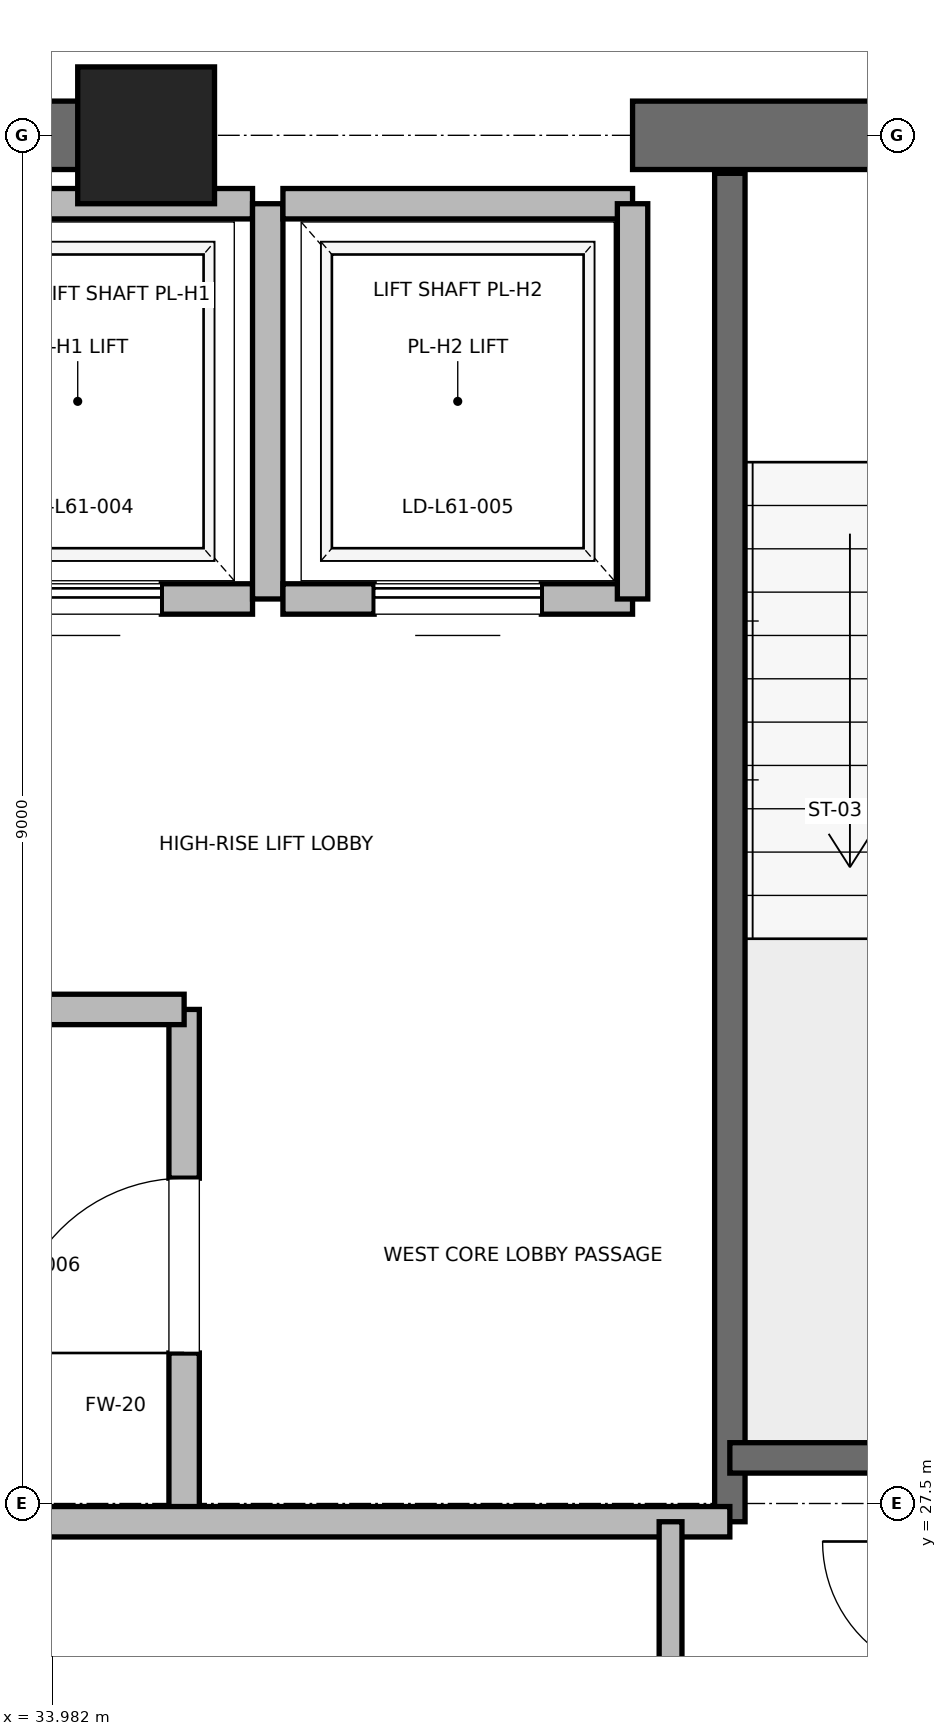
"""IFC4 building model, lengths in metres.
Left out: names, types, materials, properties, quantities, classifications, styles, units other than length and angle.
Written with IfcOpenShell. Run it as: python <this file> out.ifc"""

import sys

from ifc_helpers import new_model, si_unit, direction, frame, frame_2d, origin, origin_2d, place, context, subcontext, project, spatial, rectangle, extrude, element, fill, save


model = new_model("IFC4")
c1 = context("Model", 3, precision=1e-05, world=origin(), true_north=direction((0.0, 1.0)))
c2 = subcontext(c1, "Body", "Model", "MODEL_VIEW")
j1 = project(units=[si_unit("LENGTHUNIT", "METRE"), si_unit("PLANEANGLEUNIT", "RADIAN")], contexts=[c1])
p1 = place(None, origin())
s1 = spatial("IfcSite", under=j1, at=p1, CompositionType="ELEMENT")
p2 = place(p1, origin())
s2 = spatial("IfcBuilding", under=s1, at=p2, CompositionType="ELEMENT")
p3 = place(p2, frame((0.0, 0.0, 263.2)))
s3 = spatial("IfcBuildingStorey", under=s2, at=p3, CompositionType="ELEMENT", Elevation=263.2)
p4 = place(p3, frame((34.6, 36.5, 0.0), z_axis=(0.0, 0.0, 1.0), x_axis=(1.0, 0.0, 0.0)))
e1 = element("IfcColumn", 1, at=p4, inside=s3, PredefinedType="PILASTER", context=c2, shape_type="SweptSolid", body=[
    extrude(rectangle(XDim=0.9, YDim=0.9, at=origin_2d()), origin(), (0.0, 0.0, 1.0), 4.0),
])
p5 = place(p3, frame((29.0, 36.5, 0.0), z_axis=(0.0, 0.0, 1.0), x_axis=(1.0, 0.0, 0.0)))
e2 = element("IfcWall", 2, at=p5, inside=s3, PredefinedType="SHEAR", context=c2, shape_type="SweptSolid", body=[
    extrude(rectangle(XDim=5.8, YDim=0.45, at=frame_2d((2.9, 0.0))), origin(), (0.0, 0.0, 1.0), 3.785),
])
p6 = place(p3, frame((37.8, 36.5, 0.0), z_axis=(0.0, 0.0, 1.0), x_axis=(1.0, 0.0, 0.0)))
e3 = element("IfcWall", 3, at=p6, inside=s3, PredefinedType="SHEAR", context=c2, shape_type="SweptSolid", body=[
    extrude(rectangle(XDim=4.4, YDim=0.45, at=frame_2d((2.2, 0.0))), origin(), (0.0, 0.0, 1.0), 3.785),
])
p7 = place(p6, frame((1.65, 0.0, 0.0)))
e4 = element("IfcOpeningElement", 4, at=p7, cuts=e3, PredefinedType="OPENING", context=c2, shape_type="SweptSolid", body=[
    extrude(rectangle(XDim=1.1, YDim=2.15, at=frame_2d((0.55, 1.075))), frame((0.0, 0.225, 0.0), z_axis=(0.0, -1.0, 0.0), x_axis=(1.0, 0.0, 0.0)), (0.0, 0.0, 1.0), 0.45),
])
p8 = place(p3, frame((38.44, 27.38, 0.0), z_axis=(0.0, 0.0, 1.0), x_axis=(0.0, 1.0, 0.0)))
e5 = element("IfcWall", 5, at=p8, inside=s3, PredefinedType="SOLIDWALL", context=c2, shape_type="SweptSolid", body=[
    extrude(rectangle(XDim=8.87, YDim=0.2, at=frame_2d((4.435, 0.0))), origin(), (0.0, 0.0, 1.0), 3.785),
])
p9 = place(p3, frame((38.44, 27.8, 0.0), z_axis=(0.0, 0.0, 1.0), x_axis=(1.0, 0.0, 0.0)))
e6 = element("IfcWall", 6, at=p9, inside=s3, PredefinedType="SOLIDWALL", context=c2, shape_type="SweptSolid", body=[
    extrude(rectangle(XDim=3.32, YDim=0.2, at=frame_2d((1.66, 0.0))), origin(), (0.0, 0.0, 1.0), 3.785),
])
p10 = place(p3, frame((34.85, 27.38, 0.0), z_axis=(0.0, 0.0, 1.0), x_axis=(0.0, 1.0, 0.0)))
e7 = element("IfcWall", 7, at=p10, inside=s3, PredefinedType="PARTITIONING", context=c2, shape_type="SweptSolid", body=[
    extrude(rectangle(XDim=3.37, YDim=0.2, at=frame_2d((1.685, 0.0))), origin(), (0.0, 0.0, 1.0), 3.785),
])
p11 = place(p10, frame((1.11, 0.0, 0.0)))
e8 = element("IfcOpeningElement", 8, at=p11, cuts=e7, PredefinedType="OPENING", context=c2, shape_type="SweptSolid", body=[
    extrude(rectangle(XDim=1.15, YDim=2.2, at=frame_2d((0.575, 1.1))), frame((0.0, 0.1, 0.0), z_axis=(0.0, -1.0, 0.0), x_axis=(1.0, 0.0, 0.0)), (0.0, 0.0, 1.0), 0.2),
])
p12 = place(p3, frame((32.82, 27.38, 0.0), z_axis=(0.0, 0.0, 1.0), x_axis=(1.0, 0.0, 0.0)))
e9 = element("IfcWall", 9, at=p12, inside=s3, PredefinedType="PARTITIONING", context=c2, shape_type="SweptSolid", body=[
    extrude(rectangle(XDim=5.62, YDim=0.2, at=frame_2d((2.81, 0.0))), origin(), (0.0, 0.0, 1.0), 3.785),
])
p13 = place(p3, frame((32.15, 30.75, 0.0), z_axis=(0.0, 0.0, 1.0), x_axis=(1.0, 0.0, 0.0)))
e10 = element("IfcWall", 10, at=p13, inside=s3, PredefinedType="PARTITIONING", context=c2, shape_type="SweptSolid", body=[
    extrude(rectangle(XDim=2.7, YDim=0.2, at=frame_2d((1.35, 0.0))), origin(), (0.0, 0.0, 1.0), 3.785),
])
p14 = place(p3, frame((33.0, 33.45, 0.0), z_axis=(0.0, 0.0, 1.0), x_axis=(1.0, 0.0, 0.0)))
e11 = element("IfcWall", 11, at=p14, inside=s3, PredefinedType="SOLIDWALL", context=c2, shape_type="SweptSolid", body=[
    extrude(rectangle(XDim=2.3, YDim=0.2, at=frame_2d((1.15, 0.0))), origin(), (0.0, 0.0, 1.0), 3.785),
])
p15 = place(p14, frame((0.6, 0.0, 0.0)))
e12 = element("IfcOpeningElement", 12, at=p15, cuts=e11, PredefinedType="OPENING", context=c2, shape_type="SweptSolid", body=[
    extrude(rectangle(XDim=1.1, YDim=2.2, at=frame_2d((0.55, 1.1))), frame((0.0, 0.1, 0.0), z_axis=(0.0, -1.0, 0.0), x_axis=(1.0, 0.0, 0.0)), (0.0, 0.0, 1.0), 0.2),
])
p16 = place(p3, frame((35.3, 36.05, 0.0), z_axis=(0.0, 0.0, 1.0), x_axis=(-1.0, 0.0, 0.0)))
e13 = element("IfcWall", 13, at=p16, inside=s3, PredefinedType="SOLIDWALL", context=c2, shape_type="SweptSolid", body=[
    extrude(rectangle(XDim=2.3, YDim=0.2, at=frame_2d((1.15, 0.0))), origin(), (0.0, 0.0, 1.0), 2.865),
])
p17 = place(p3, frame((35.4, 33.45, 0.0), z_axis=(0.0, 0.0, 1.0), x_axis=(0.0, 1.0, 0.0)))
e14 = element("IfcWall", 14, at=p17, inside=s3, PredefinedType="SOLIDWALL", context=c2, shape_type="SweptSolid", body=[
    extrude(rectangle(XDim=2.6, YDim=0.2, at=frame_2d((1.3, 0.0))), origin(), (0.0, 0.0, 1.0), 2.865),
])
p18 = place(p3, frame((35.5, 33.45, 0.0), z_axis=(0.0, 0.0, 1.0), x_axis=(1.0, 0.0, 0.0)))
e15 = element("IfcWall", 15, at=p18, inside=s3, PredefinedType="SOLIDWALL", context=c2, shape_type="SweptSolid", body=[
    extrude(rectangle(XDim=2.3, YDim=0.2, at=frame_2d((1.15, 0.0))), origin(), (0.0, 0.0, 1.0), 3.785),
])
p19 = place(p18, frame((0.6, 0.0, 0.0)))
e16 = element("IfcOpeningElement", 16, at=p19, cuts=e15, PredefinedType="OPENING", context=c2, shape_type="SweptSolid", body=[
    extrude(rectangle(XDim=1.1, YDim=2.2, at=frame_2d((0.55, 1.1))), frame((0.0, 0.1, 0.0), z_axis=(0.0, -1.0, 0.0), x_axis=(1.0, 0.0, 0.0)), (0.0, 0.0, 1.0), 0.2),
])
p20 = place(p3, frame((37.8, 36.05, 0.0), z_axis=(0.0, 0.0, 1.0), x_axis=(-1.0, 0.0, 0.0)))
e17 = element("IfcWall", 17, at=p20, inside=s3, PredefinedType="SOLIDWALL", context=c2, shape_type="SweptSolid", body=[
    extrude(rectangle(XDim=2.3, YDim=0.2, at=frame_2d((1.15, 0.0))), origin(), (0.0, 0.0, 1.0), 2.865),
])
p21 = place(p3, frame((37.8, 33.45, 0.0), z_axis=(0.0, 0.0, 1.0), x_axis=(0.0, 1.0, 0.0)))
e18 = element("IfcWall", 18, at=p21, inside=s3, PredefinedType="SOLIDWALL", context=c2, shape_type="SweptSolid", body=[
    extrude(rectangle(XDim=2.6, YDim=0.2, at=frame_2d((1.3, 0.0))), origin(), (0.0, 0.0, 1.0), 2.865),
])
p22 = place(p3, frame((38.05, 18.6, 0.0), z_axis=(0.0, 0.0, 1.0), x_axis=(0.0, 1.0, 0.0)))
e19 = element("IfcWall", 19, at=p22, inside=s3, PredefinedType="PARTITIONING", context=c2, shape_type="SweptSolid", body=[
    extrude(rectangle(XDim=8.78, YDim=0.15, at=frame_2d((4.39, 0.0))), origin(), (0.0, 0.0, 1.0), 2.85),
])
p23 = place(p22, frame((3.89, 0.0, 0.0)))
e20 = element("IfcOpeningElement", 20, at=p23, cuts=e19, PredefinedType="OPENING", context=c2, shape_type="SweptSolid", body=[
    extrude(rectangle(XDim=1.0, YDim=2.15, at=frame_2d((0.5, 1.075))), frame((0.0, 0.075, 0.0), z_axis=(0.0, -1.0, 0.0), x_axis=(1.0, 0.0, 0.0)), (0.0, 0.0, 1.0), 0.15),
])
p24 = place(p11, origin())
e21 = element("IfcDoor", 21, at=p24, inside=s3, OperationType="SINGLE_SWING_LEFT", PredefinedType="DOOR", context=c2, shape_type="SweptSolid", body=[
    extrude(rectangle(XDim=1.15, YDim=2.2, at=frame_2d((0.575, 1.1))), frame((0.0, 0.025, 0.0), z_axis=(0.0, -1.0, 0.0), x_axis=(1.0, 0.0, 0.0)), (0.0, 0.0, 1.0), 0.05),
])
fill(e8, e21)
p25 = place(p15, origin())
e22 = element("IfcDoor", 22, at=p25, inside=s3, OperationType="SLIDING_TO_RIGHT", PredefinedType="DOOR", context=c2, shape_type="SweptSolid", body=[
    extrude(rectangle(XDim=1.1, YDim=2.2, at=frame_2d((0.55, 1.1))), frame((0.0, 0.025, 0.0), z_axis=(0.0, -1.0, 0.0), x_axis=(1.0, 0.0, 0.0)), (0.0, 0.0, 1.0), 0.05),
])
fill(e12, e22)
p26 = place(p19, origin())
e23 = element("IfcDoor", 23, at=p26, inside=s3, OperationType="SLIDING_TO_RIGHT", PredefinedType="DOOR", context=c2, shape_type="SweptSolid", body=[
    extrude(rectangle(XDim=1.1, YDim=2.2, at=frame_2d((0.55, 1.1))), frame((0.0, 0.025, 0.0), z_axis=(0.0, -1.0, 0.0), x_axis=(1.0, 0.0, 0.0)), (0.0, 0.0, 1.0), 0.05),
])
fill(e16, e23)
save(model, sys.argv[1])
